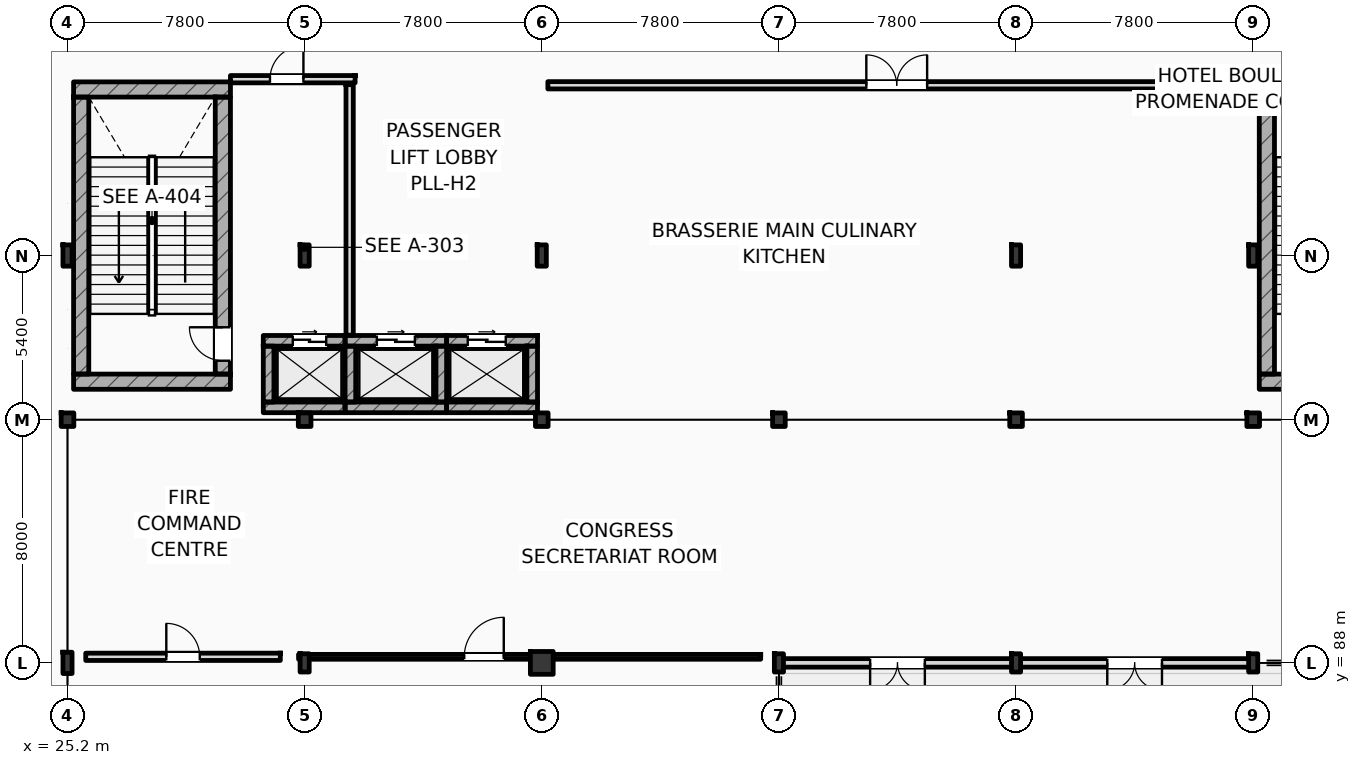
"""IFC4 building model, lengths in metres.
Left out: names, types, materials, properties, quantities, classifications, styles, units other than length and angle.
Written with IfcOpenShell. Run it as: python <this file> out.ifc"""

import sys

from ifc_helpers import new_model, si_unit, direction, frame, frame_2d, origin, origin_2d, place, context, subcontext, project, spatial, rectangle, i_section, extrude, element, fill, save


model = new_model("IFC4")
c1 = context("Model", 3, precision=1e-05, world=origin(), true_north=direction((0.0, 1.0)))
c2 = subcontext(c1, "Body", "Model", "MODEL_VIEW")
j1 = project(units=[si_unit("LENGTHUNIT", "METRE"), si_unit("PLANEANGLEUNIT", "RADIAN")], contexts=[c1])
p1 = place(None, origin())
s1 = spatial("IfcSite", under=j1, at=p1, CompositionType="ELEMENT")
p2 = place(p1, origin())
s2 = spatial("IfcBuilding", under=s1, at=p2, CompositionType="ELEMENT")
p3 = place(p2, origin())
s3 = spatial("IfcBuildingStorey", under=s2, at=p3, CompositionType="ELEMENT", Elevation=0.0)
p4 = place(p3, frame((25.2, 88.0, 0.0), z_axis=(0.0, 0.0, 1.0), x_axis=(1.0, 0.0, 0.0)))
e1 = element("IfcColumn", 1, at=p4, inside=s3, PredefinedType="COLUMN", context=c2, shape_type="SweptSolid", body=[
    extrude(i_section(OverallWidth=0.3, OverallDepth=0.7, WebThickness=0.017, FlangeThickness=0.032, FilletRadius=0.027, at=origin_2d()), origin(), (0.0, 0.0, 1.0), 6.0),
])
p5 = place(p3, frame((25.2, 96.0, 0.0), z_axis=(0.0, 0.0, 1.0), x_axis=(1.0, 0.0, 0.0)))
e2 = element("IfcColumn", 2, at=p5, inside=s3, PredefinedType="COLUMN", context=c2, shape_type="SweptSolid", body=[
    extrude(i_section(OverallWidth=0.416, OverallDepth=0.446, WebThickness=0.036, FlangeThickness=0.048, FilletRadius=0.015, at=origin_2d()), origin(), (0.0, 0.0, 1.0), 6.0),
])
p6 = place(p3, frame((25.2, 101.4, 0.0), z_axis=(0.0, 0.0, 1.0), x_axis=(1.0, 0.0, 0.0)))
e3 = element("IfcColumn", 3, at=p6, inside=s3, PredefinedType="COLUMN", context=c2, shape_type="SweptSolid", body=[
    extrude(i_section(OverallWidth=0.3, OverallDepth=0.7, WebThickness=0.017, FlangeThickness=0.032, FilletRadius=0.027, at=origin_2d()), origin(), (0.0, 0.0, 1.0), 6.0),
])
p7 = place(p3, frame((33.0, 96.0, 0.0), z_axis=(0.0, 0.0, 1.0), x_axis=(1.0, 0.0, 0.0)))
e4 = element("IfcColumn", 4, at=p7, inside=s3, PredefinedType="COLUMN", context=c2, shape_type="SweptSolid", body=[
    extrude(i_section(OverallWidth=0.416, OverallDepth=0.446, WebThickness=0.036, FlangeThickness=0.048, FilletRadius=0.015, at=origin_2d()), origin(), (0.0, 0.0, 1.0), 6.0),
])
p8 = place(p3, frame((33.0, 101.4, 0.0), z_axis=(0.0, 0.0, 1.0), x_axis=(1.0, 0.0, 0.0)))
e5 = element("IfcColumn", 5, at=p8, inside=s3, PredefinedType="COLUMN", context=c2, shape_type="SweptSolid", body=[
    extrude(i_section(OverallWidth=0.3, OverallDepth=0.7, WebThickness=0.017, FlangeThickness=0.032, FilletRadius=0.027, at=origin_2d()), origin(), (0.0, 0.0, 1.0), 6.0),
])
p9 = place(p3, frame((40.8, 96.0, 0.0), z_axis=(0.0, 0.0, 1.0), x_axis=(1.0, 0.0, 0.0)))
e6 = element("IfcColumn", 6, at=p9, inside=s3, PredefinedType="COLUMN", context=c2, shape_type="SweptSolid", body=[
    extrude(i_section(OverallWidth=0.416, OverallDepth=0.446, WebThickness=0.036, FlangeThickness=0.048, FilletRadius=0.015, at=origin_2d()), origin(), (0.0, 0.0, 1.0), 6.0),
])
p10 = place(p3, frame((40.8, 101.4, 0.0), z_axis=(0.0, 0.0, 1.0), x_axis=(1.0, 0.0, 0.0)))
e7 = element("IfcColumn", 7, at=p10, inside=s3, PredefinedType="COLUMN", context=c2, shape_type="SweptSolid", body=[
    extrude(i_section(OverallWidth=0.3, OverallDepth=0.7, WebThickness=0.017, FlangeThickness=0.032, FilletRadius=0.027, at=origin_2d()), origin(), (0.0, 0.0, 1.0), 6.0),
])
p11 = place(p3, frame((48.6, 96.0, 0.0), z_axis=(0.0, 0.0, 1.0), x_axis=(1.0, 0.0, 0.0)))
e8 = element("IfcColumn", 8, at=p11, inside=s3, PredefinedType="COLUMN", context=c2, shape_type="SweptSolid", body=[
    extrude(i_section(OverallWidth=0.416, OverallDepth=0.446, WebThickness=0.036, FlangeThickness=0.048, FilletRadius=0.015, at=origin_2d()), origin(), (0.0, 0.0, 1.0), 6.0),
])
p12 = place(p3, frame((48.6, 101.4, 0.0), z_axis=(0.0, 0.0, 1.0), x_axis=(1.0, 0.0, 0.0)))
e9 = element("IfcColumn", 9, at=p12, inside=s3, PredefinedType="COLUMN", context=c2, shape_type="SweptSolid", body=[
    extrude(i_section(OverallWidth=0.3, OverallDepth=0.7, WebThickness=0.017, FlangeThickness=0.032, FilletRadius=0.027, at=origin_2d()), origin(), (0.0, 0.0, 1.0), 6.0),
])
p13 = place(p3, frame((56.4, 96.0, 0.0), z_axis=(0.0, 0.0, 1.0), x_axis=(1.0, 0.0, 0.0)))
e10 = element("IfcColumn", 10, at=p13, inside=s3, PredefinedType="COLUMN", context=c2, shape_type="SweptSolid", body=[
    extrude(i_section(OverallWidth=0.416, OverallDepth=0.446, WebThickness=0.036, FlangeThickness=0.048, FilletRadius=0.015, at=origin_2d()), origin(), (0.0, 0.0, 1.0), 6.0),
])
p14 = place(p3, frame((56.4, 101.4, 0.0), z_axis=(0.0, 0.0, 1.0), x_axis=(1.0, 0.0, 0.0)))
e11 = element("IfcColumn", 11, at=p14, inside=s3, PredefinedType="COLUMN", context=c2, shape_type="SweptSolid", body=[
    extrude(i_section(OverallWidth=0.3, OverallDepth=0.7, WebThickness=0.017, FlangeThickness=0.032, FilletRadius=0.027, at=origin_2d()), origin(), (0.0, 0.0, 1.0), 6.0),
])
p15 = place(p3, frame((64.2, 96.0, 0.0), z_axis=(0.0, 0.0, 1.0), x_axis=(1.0, 0.0, 0.0)))
e12 = element("IfcColumn", 12, at=p15, inside=s3, PredefinedType="COLUMN", context=c2, shape_type="SweptSolid", body=[
    extrude(i_section(OverallWidth=0.416, OverallDepth=0.446, WebThickness=0.036, FlangeThickness=0.048, FilletRadius=0.015, at=origin_2d()), origin(), (0.0, 0.0, 1.0), 6.0),
])
p16 = place(p3, frame((64.2, 101.4, 0.0), z_axis=(0.0, 0.0, 1.0), x_axis=(1.0, 0.0, 0.0)))
e13 = element("IfcColumn", 13, at=p16, inside=s3, PredefinedType="COLUMN", context=c2, shape_type="SweptSolid", body=[
    extrude(i_section(OverallWidth=0.3, OverallDepth=0.7, WebThickness=0.017, FlangeThickness=0.032, FilletRadius=0.027, at=origin_2d()), origin(), (0.0, 0.0, 1.0), 6.0),
])
p17 = place(p3, frame((33.0, 88.0, 0.0), z_axis=(0.0, 0.0, 1.0), x_axis=(1.0, 0.0, 0.0)))
e14 = element("IfcColumn", 14, at=p17, inside=s3, PredefinedType="COLUMN", context=c2, shape_type="SweptSolid", body=[
    extrude(i_section(OverallWidth=0.3, OverallDepth=0.6, WebThickness=0.015, FlangeThickness=0.03, FilletRadius=0.027, at=origin_2d()), origin(), (0.0, 0.0, 1.0), 6.0),
])
p18 = place(p3, frame((40.8, 88.0, 0.0), z_axis=(0.0, 0.0, 1.0), x_axis=(1.0, 0.0, 0.0)))
e15 = element("IfcColumn", 15, at=p18, inside=s3, PredefinedType="COLUMN", context=c2, shape_type="SweptSolid", body=[
    extrude(rectangle(XDim=0.75, YDim=0.75, at=origin_2d()), origin(), (0.0, 0.0, 1.0), 6.0),
])
for number, where, z_axis, x_axis in (
    (16, (48.6, 88.0, 0.0), (0.0, 0.0, 1.0), (1.0, 0.0, 0.0)),
    (17, (56.4, 88.0, 0.0), (0.0, 0.0, 1.0), (1.0, 0.0, 0.0)),
    (18, (64.2, 88.0, 0.0), (0.0, 0.0, 1.0), (1.0, 0.0, 0.0)),
):
    element("IfcColumn", number, at=place(p3, frame(where, z_axis=z_axis, x_axis=x_axis)), inside=s3, PredefinedType="COLUMN", context=c2, shape_type="SweptSolid", body=[
        extrude(i_section(OverallWidth=0.3, OverallDepth=0.6, WebThickness=0.015, FlangeThickness=0.03, FilletRadius=0.027, at=origin_2d()), origin(), (0.0, 0.0, 1.0), 6.0),
    ])
for number, where, z_axis, x_axis in (
    (19, (25.4, 106.862, 0.0), (0.0, 0.0, 1.0), (1.0, 0.0, 0.0)),
    (20, (25.4, 97.25, 0.0), (0.0, 0.0, 1.0), (1.0, 0.0, 0.0)),
):
    element("IfcWall", number, at=place(p3, frame(where, z_axis=z_axis, x_axis=x_axis)), inside=s3, PredefinedType="SHEAR", context=c2, shape_type="SweptSolid", body=[
        extrude(rectangle(XDim=5.16, YDim=0.5, at=frame_2d((2.58, 0.0))), origin(), (0.0, 0.0, 1.0), 6.0),
    ])
p19 = place(p3, frame((25.65, 97.5, 0.0), z_axis=(0.0, 0.0, 1.0), x_axis=(0.0, 1.0, 0.0)))
e21 = element("IfcWall", 21, at=p19, inside=s3, PredefinedType="SHEAR", context=c2, shape_type="SweptSolid", body=[
    extrude(rectangle(XDim=9.112, YDim=0.5, at=frame_2d((4.556, 0.0))), origin(), (0.0, 0.0, 1.0), 6.0),
])
p20 = place(p3, frame((30.31, 97.5, 0.0), z_axis=(0.0, 0.0, 1.0), x_axis=(0.0, 1.0, 0.0)))
e22 = element("IfcWall", 22, at=p20, inside=s3, PredefinedType="SHEAR", context=c2, shape_type="SweptSolid", body=[
    extrude(rectangle(XDim=9.112, YDim=0.5, at=frame_2d((4.556, 0.0))), origin(), (0.0, 0.0, 1.0), 6.0),
])
p21 = place(p20, frame((0.44, 0.0, 0.0)))
e23 = element("IfcOpeningElement", 23, at=p21, cuts=e22, PredefinedType="OPENING", context=c2, shape_type="SweptSolid", body=[
    extrude(rectangle(XDim=1.1, YDim=2.2, at=frame_2d((0.55, 1.1))), frame((0.0, 0.26, 0.0), z_axis=(0.0, -1.0, 0.0), x_axis=(1.0, 0.0, 0.0)), (0.0, 0.0, 1.0), 0.52),
])
for number, where, z_axis, x_axis in (
    (24, (64.4, 106.862, 0.0), (0.0, 0.0, 1.0), (1.0, 0.0, 0.0)),
    (25, (64.4, 97.25, 0.0), (0.0, 0.0, 1.0), (1.0, 0.0, 0.0)),
):
    element("IfcWall", number, at=place(p3, frame(where, z_axis=z_axis, x_axis=x_axis)), inside=s3, PredefinedType="SHEAR", context=c2, shape_type="SweptSolid", body=[
        extrude(rectangle(XDim=5.16, YDim=0.5, at=frame_2d((2.58, 0.0))), origin(), (0.0, 0.0, 1.0), 6.0),
    ])
p22 = place(p3, frame((64.65, 97.5, 0.0), z_axis=(0.0, 0.0, 1.0), x_axis=(0.0, 1.0, 0.0)))
e26 = element("IfcWall", 26, at=p22, inside=s3, PredefinedType="SHEAR", context=c2, shape_type="SweptSolid", body=[
    extrude(rectangle(XDim=9.112, YDim=0.5, at=frame_2d((4.556, 0.0))), origin(), (0.0, 0.0, 1.0), 6.0),
])
p23 = place(p3, frame((48.6, 88.0, 0.0), z_axis=(0.0, 0.0, 1.0), x_axis=(1.0, 0.0, 0.0)))
e27 = element("IfcWall", 27, at=p23, inside=s3, PredefinedType="STANDARD", context=c2, shape_type="SweptSolid", body=[
    extrude(rectangle(XDim=7.8, YDim=0.28, at=frame_2d((3.9, 0.0))), origin(), (0.0, 0.0, 1.0), 5.19),
])
p24 = place(p23, frame((3.0, 0.0, 0.0)))
e28 = element("IfcOpeningElement", 28, at=p24, cuts=e27, PredefinedType="OPENING", context=c2, shape_type="SweptSolid", body=[
    extrude(rectangle(XDim=1.8, YDim=2.4, at=frame_2d((0.9, 1.2))), frame((0.0, 0.15, 0.0), z_axis=(0.0, -1.0, 0.0), x_axis=(1.0, 0.0, 0.0)), (0.0, 0.0, 1.0), 0.3),
])
p25 = place(p3, frame((56.4, 88.0, 0.0), z_axis=(0.0, 0.0, 1.0), x_axis=(1.0, 0.0, 0.0)))
e29 = element("IfcWall", 29, at=p25, inside=s3, PredefinedType="STANDARD", context=c2, shape_type="SweptSolid", body=[
    extrude(rectangle(XDim=7.8, YDim=0.28, at=frame_2d((3.9, 0.0))), origin(), (0.0, 0.0, 1.0), 5.19),
])
p26 = place(p25, frame((3.0, 0.0, 0.0)))
e30 = element("IfcOpeningElement", 30, at=p26, cuts=e29, PredefinedType="OPENING", context=c2, shape_type="SweptSolid", body=[
    extrude(rectangle(XDim=1.8, YDim=2.4, at=frame_2d((0.9, 1.2))), frame((0.0, 0.15, 0.0), z_axis=(0.0, -1.0, 0.0), x_axis=(1.0, 0.0, 0.0)), (0.0, 0.0, 1.0), 0.3),
])
p27 = place(p3, frame((31.64, 98.595, 0.0), z_axis=(0.0, 0.0, 1.0), x_axis=(1.0, 0.0, 0.0)))
e31 = element("IfcWall", 31, at=p27, inside=s3, PredefinedType="SHEAR", context=c2, shape_type="SweptSolid", body=[
    extrude(rectangle(XDim=2.69, YDim=0.35, at=frame_2d((1.345, 0.0))), origin(), (0.0, 0.0, 1.0), 5.7),
])
p28 = place(p27, frame((0.97, 0.0, 0.0)))
e32 = element("IfcOpeningElement", 32, at=p28, cuts=e31, PredefinedType="OPENING", context=c2, shape_type="SweptSolid", body=[
    extrude(rectangle(XDim=1.1, YDim=2.2, at=frame_2d((0.55, 1.1))), frame((0.0, 0.185, 0.0), z_axis=(0.0, -1.0, 0.0), x_axis=(1.0, 0.0, 0.0)), (0.0, 0.0, 1.0), 0.37),
])
p29 = place(p3, frame((31.64, 96.405, 0.0), z_axis=(0.0, 0.0, 1.0), x_axis=(1.0, 0.0, 0.0)))
e33 = element("IfcWall", 33, at=p29, inside=s3, PredefinedType="SHEAR", context=c2, shape_type="SweptSolid", body=[
    extrude(rectangle(XDim=2.69, YDim=0.35, at=frame_2d((1.345, 0.0))), origin(), (0.0, 0.0, 1.0), 5.7),
])
p30 = place(p3, frame((31.815, 96.58, 0.0), z_axis=(0.0, 0.0, 1.0), x_axis=(0.0, 1.0, 0.0)))
e34 = element("IfcWall", 34, at=p30, inside=s3, PredefinedType="SHEAR", context=c2, shape_type="SweptSolid", body=[
    extrude(rectangle(XDim=1.84, YDim=0.35, at=frame_2d((0.92, 0.0))), origin(), (0.0, 0.0, 1.0), 5.7),
])
p31 = place(p3, frame((34.33, 98.595, 0.0), z_axis=(0.0, 0.0, 1.0), x_axis=(1.0, 0.0, 0.0)))
e35 = element("IfcWall", 35, at=p31, inside=s3, PredefinedType="SHEAR", context=c2, shape_type="SweptSolid", body=[
    extrude(rectangle(XDim=3.34, YDim=0.35, at=frame_2d((1.67, 0.0))), origin(), (0.0, 0.0, 1.0), 5.7),
])
p32 = place(p31, frame((1.045, 0.0, 0.0)))
e36 = element("IfcOpeningElement", 36, at=p32, cuts=e35, PredefinedType="OPENING", context=c2, shape_type="SweptSolid", body=[
    extrude(rectangle(XDim=1.25, YDim=2.25, at=frame_2d((0.625, 1.125))), frame((0.0, 0.185, 0.0), z_axis=(0.0, -1.0, 0.0), x_axis=(1.0, 0.0, 0.0)), (0.0, 0.0, 1.0), 0.37),
])
p33 = place(p3, frame((34.33, 96.405, 0.0), z_axis=(0.0, 0.0, 1.0), x_axis=(1.0, 0.0, 0.0)))
e37 = element("IfcWall", 37, at=p33, inside=s3, PredefinedType="SHEAR", context=c2, shape_type="SweptSolid", body=[
    extrude(rectangle(XDim=3.34, YDim=0.35, at=frame_2d((1.67, 0.0))), origin(), (0.0, 0.0, 1.0), 5.7),
])
for number, where, z_axis, x_axis in (
    (38, (34.505, 96.58, 0.0), (0.0, 0.0, 1.0), (0.0, 1.0, 0.0)),
    (39, (37.495, 96.58, 0.0), (0.0, 0.0, 1.0), (0.0, 1.0, 0.0)),
):
    element("IfcWall", number, at=place(p3, frame(where, z_axis=z_axis, x_axis=x_axis)), inside=s3, PredefinedType="SHEAR", context=c2, shape_type="SweptSolid", body=[
        extrude(rectangle(XDim=1.84, YDim=0.35, at=frame_2d((0.92, 0.0))), origin(), (0.0, 0.0, 1.0), 5.7),
    ])
p34 = place(p3, frame((37.67, 98.595, 0.0), z_axis=(0.0, 0.0, 1.0), x_axis=(1.0, 0.0, 0.0)))
e40 = element("IfcWall", 40, at=p34, inside=s3, PredefinedType="SHEAR", context=c2, shape_type="SweptSolid", body=[
    extrude(rectangle(XDim=2.99, YDim=0.35, at=frame_2d((1.495, 0.0))), origin(), (0.0, 0.0, 1.0), 5.7),
])
p35 = place(p34, frame((0.695, 0.0, 0.0)))
e41 = element("IfcOpeningElement", 41, at=p35, cuts=e40, PredefinedType="OPENING", context=c2, shape_type="SweptSolid", body=[
    extrude(rectangle(XDim=1.25, YDim=2.25, at=frame_2d((0.625, 1.125))), frame((0.0, 0.185, 0.0), z_axis=(0.0, -1.0, 0.0), x_axis=(1.0, 0.0, 0.0)), (0.0, 0.0, 1.0), 0.37),
])
p36 = place(p3, frame((37.67, 96.405, 0.0), z_axis=(0.0, 0.0, 1.0), x_axis=(1.0, 0.0, 0.0)))
e42 = element("IfcWall", 42, at=p36, inside=s3, PredefinedType="SHEAR", context=c2, shape_type="SweptSolid", body=[
    extrude(rectangle(XDim=2.99, YDim=0.35, at=frame_2d((1.495, 0.0))), origin(), (0.0, 0.0, 1.0), 5.7),
])
p37 = place(p3, frame((40.485, 96.58, 0.0), z_axis=(0.0, 0.0, 1.0), x_axis=(0.0, 1.0, 0.0)))
e43 = element("IfcWall", 43, at=p37, inside=s3, PredefinedType="SHEAR", context=c2, shape_type="SweptSolid", body=[
    extrude(rectangle(XDim=1.84, YDim=0.35, at=frame_2d((0.92, 0.0))), origin(), (0.0, 0.0, 1.0), 5.24),
])
p38 = place(p3, frame((34.48, 98.78, 0.0), z_axis=(0.0, 0.0, 1.0), x_axis=(0.0, 1.0, 0.0)))
e44 = element("IfcWall", 44, at=p38, inside=s3, PredefinedType="STANDARD", context=c2, shape_type="SweptSolid", body=[
    extrude(rectangle(XDim=8.24, YDim=0.24, at=frame_2d((4.12, 0.0))), origin(), (0.0, 0.0, 1.0), 5.7),
])
p39 = place(p3, frame((30.56, 107.2, 0.0), z_axis=(0.0, 0.0, 1.0), x_axis=(1.0, 0.0, 0.0)))
e45 = element("IfcWall", 45, at=p39, inside=s3, PredefinedType="STANDARD", context=c2, shape_type="SweptSolid", body=[
    extrude(rectangle(XDim=4.1, YDim=0.24, at=frame_2d((2.05, 0.0))), origin(), (0.0, 0.0, 1.0), 5.7),
])
p40 = place(p39, frame((1.3, 0.0, 0.0)))
e46 = element("IfcOpeningElement", 46, at=p40, cuts=e45, PredefinedType="OPENING", context=c2, shape_type="SweptSolid", body=[
    extrude(rectangle(XDim=1.1, YDim=2.2, at=frame_2d((0.55, 1.1))), frame((0.0, 0.13, 0.0), z_axis=(0.0, -1.0, 0.0), x_axis=(1.0, 0.0, 0.0)), (0.0, 0.0, 1.0), 0.26),
])
p41 = place(p3, frame((25.8, 88.2, 0.0), z_axis=(0.0, 0.0, 1.0), x_axis=(1.0, 0.0, 0.0)))
e47 = element("IfcWall", 47, at=p41, inside=s3, PredefinedType="STANDARD", context=c2, shape_type="SweptSolid", body=[
    extrude(rectangle(XDim=6.4, YDim=0.24, at=frame_2d((3.2, 0.0))), origin(), (0.0, 0.0, 1.0), 5.19),
])
p42 = place(p41, frame((2.65, 0.0, 0.0)))
e48 = element("IfcOpeningElement", 48, at=p42, cuts=e47, PredefinedType="OPENING", context=c2, shape_type="SweptSolid", body=[
    extrude(rectangle(XDim=1.1, YDim=2.2, at=frame_2d((0.55, 1.1))), frame((0.0, 0.13, 0.0), z_axis=(0.0, -1.0, 0.0), x_axis=(1.0, 0.0, 0.0)), (0.0, 0.0, 1.0), 0.26),
])
p43 = place(p3, frame((32.8, 88.2, 0.0), z_axis=(0.0, 0.0, 1.0), x_axis=(1.0, 0.0, 0.0)))
e49 = element("IfcWall", 49, at=p43, inside=s3, PredefinedType="PARTITIONING", context=c2, shape_type="SweptSolid", body=[
    extrude(rectangle(XDim=15.2, YDim=0.16, at=frame_2d((7.6, 0.0))), origin(), (0.0, 0.0, 1.0), 5.19),
])
p44 = place(p43, frame((5.45, 0.0, 0.0)))
e50 = element("IfcOpeningElement", 50, at=p44, cuts=e49, PredefinedType="OPENING", context=c2, shape_type="SweptSolid", body=[
    extrude(rectangle(XDim=1.3, YDim=2.2, at=frame_2d((0.65, 1.1))), frame((0.0, 0.09, 0.0), z_axis=(0.0, -1.0, 0.0), x_axis=(1.0, 0.0, 0.0)), (0.0, 0.0, 1.0), 0.18),
])
p45 = place(p3, frame((41.0, 107.0, 0.0), z_axis=(0.0, 0.0, 1.0), x_axis=(1.0, 0.0, 0.0)))
e51 = element("IfcWall", 51, at=p45, inside=s3, PredefinedType="STANDARD", context=c2, shape_type="SweptSolid", body=[
    extrude(rectangle(XDim=22.95, YDim=0.24, at=frame_2d((11.475, 0.0))), origin(), (0.0, 0.0, 1.0), 5.7),
])
p46 = place(p45, frame((10.475, 0.0, 0.0)))
e52 = element("IfcOpeningElement", 52, at=p46, cuts=e51, PredefinedType="OPENING", context=c2, shape_type="SweptSolid", body=[
    extrude(rectangle(XDim=2.0, YDim=2.35, at=frame_2d((1.0, 1.175))), frame((0.0, 0.13, 0.0), z_axis=(0.0, -1.0, 0.0), x_axis=(1.0, 0.0, 0.0)), (0.0, 0.0, 1.0), 0.26),
])
p47 = place(p24, frame((1.8, 0.0, 0.0), z_axis=(0.0, 0.0, 1.0), x_axis=(-1.0, 0.0, 0.0)))
e53 = element("IfcDoor", 53, at=p47, inside=s3, OperationType="DOUBLE_SWING_LEFT", PredefinedType="DOOR", context=c2, shape_type="SweptSolid", body=[
    extrude(rectangle(XDim=1.8, YDim=2.4, at=frame_2d((0.9, 1.2))), frame((0.0, 0.025, 0.0), z_axis=(0.0, -1.0, 0.0), x_axis=(1.0, 0.0, 0.0)), (0.0, 0.0, 1.0), 0.05),
])
fill(e28, e53)
p48 = place(p26, frame((1.8, 0.0, 0.0), z_axis=(0.0, 0.0, 1.0), x_axis=(-1.0, 0.0, 0.0)))
e54 = element("IfcDoor", 54, at=p48, inside=s3, OperationType="DOUBLE_SWING_LEFT", PredefinedType="DOOR", context=c2, shape_type="SweptSolid", body=[
    extrude(rectangle(XDim=1.8, YDim=2.4, at=frame_2d((0.9, 1.2))), frame((0.0, 0.025, 0.0), z_axis=(0.0, -1.0, 0.0), x_axis=(1.0, 0.0, 0.0)), (0.0, 0.0, 1.0), 0.05),
])
fill(e30, e54)
p49 = place(p21, origin())
e55 = element("IfcDoor", 55, at=p49, inside=s3, OperationType="SINGLE_SWING_RIGHT", PredefinedType="DOOR", context=c2, shape_type="SweptSolid", body=[
    extrude(rectangle(XDim=1.1, YDim=2.2, at=frame_2d((0.55, 1.1))), frame((0.0, 0.025, 0.0), z_axis=(0.0, -1.0, 0.0), x_axis=(1.0, 0.0, 0.0)), (0.0, 0.0, 1.0), 0.05),
])
fill(e23, e55)
p50 = place(p28, origin())
e56 = element("IfcDoor", 56, at=p50, inside=s3, OperationType="SLIDING_TO_LEFT", PredefinedType="DOOR", context=c2, shape_type="SweptSolid", body=[
    extrude(rectangle(XDim=1.1, YDim=2.2, at=frame_2d((0.55, 1.1))), frame((0.0, 0.025, 0.0), z_axis=(0.0, -1.0, 0.0), x_axis=(1.0, 0.0, 0.0)), (0.0, 0.0, 1.0), 0.05),
])
fill(e32, e56)
p51 = place(p32, origin())
e57 = element("IfcDoor", 57, at=p51, inside=s3, OperationType="SLIDING_TO_LEFT", PredefinedType="DOOR", context=c2, shape_type="SweptSolid", body=[
    extrude(rectangle(XDim=1.25, YDim=2.25, at=frame_2d((0.625, 1.125))), frame((0.0, 0.025, 0.0), z_axis=(0.0, -1.0, 0.0), x_axis=(1.0, 0.0, 0.0)), (0.0, 0.0, 1.0), 0.05),
])
fill(e36, e57)
p52 = place(p35, origin())
e58 = element("IfcDoor", 58, at=p52, inside=s3, OperationType="SLIDING_TO_LEFT", PredefinedType="DOOR", context=c2, shape_type="SweptSolid", body=[
    extrude(rectangle(XDim=1.25, YDim=2.25, at=frame_2d((0.625, 1.125))), frame((0.0, 0.025, 0.0), z_axis=(0.0, -1.0, 0.0), x_axis=(1.0, 0.0, 0.0)), (0.0, 0.0, 1.0), 0.05),
])
fill(e41, e58)
p53 = place(p40, origin())
e59 = element("IfcDoor", 59, at=p53, inside=s3, OperationType="SINGLE_SWING_RIGHT", PredefinedType="DOOR", context=c2, shape_type="SweptSolid", body=[
    extrude(rectangle(XDim=1.1, YDim=2.2, at=frame_2d((0.55, 1.1))), frame((0.0, 0.025, 0.0), z_axis=(0.0, -1.0, 0.0), x_axis=(1.0, 0.0, 0.0)), (0.0, 0.0, 1.0), 0.05),
])
fill(e46, e59)
p54 = place(p42, origin())
e60 = element("IfcDoor", 60, at=p54, inside=s3, OperationType="SINGLE_SWING_LEFT", PredefinedType="DOOR", context=c2, shape_type="SweptSolid", body=[
    extrude(rectangle(XDim=1.1, YDim=2.2, at=frame_2d((0.55, 1.1))), frame((0.0, 0.025, 0.0), z_axis=(0.0, -1.0, 0.0), x_axis=(1.0, 0.0, 0.0)), (0.0, 0.0, 1.0), 0.05),
])
fill(e48, e60)
p55 = place(p44, origin())
e61 = element("IfcDoor", 61, at=p55, inside=s3, OperationType="SINGLE_SWING_RIGHT", PredefinedType="DOOR", context=c2, shape_type="SweptSolid", body=[
    extrude(rectangle(XDim=1.3, YDim=2.2, at=frame_2d((0.65, 1.1))), frame((0.0, 0.025, 0.0), z_axis=(0.0, -1.0, 0.0), x_axis=(1.0, 0.0, 0.0)), (0.0, 0.0, 1.0), 0.05),
])
fill(e50, e61)
p56 = place(p46, origin())
e62 = element("IfcDoor", 62, at=p56, inside=s3, OperationType="DOUBLE_SWING_LEFT", PredefinedType="DOOR", context=c2, shape_type="SweptSolid", body=[
    extrude(rectangle(XDim=2.0, YDim=2.35, at=frame_2d((1.0, 1.175))), frame((0.0, 0.025, 0.0), z_axis=(0.0, -1.0, 0.0), x_axis=(1.0, 0.0, 0.0)), (0.0, 0.0, 1.0), 0.05),
])
fill(e52, e62)
save(model, sys.argv[1])
